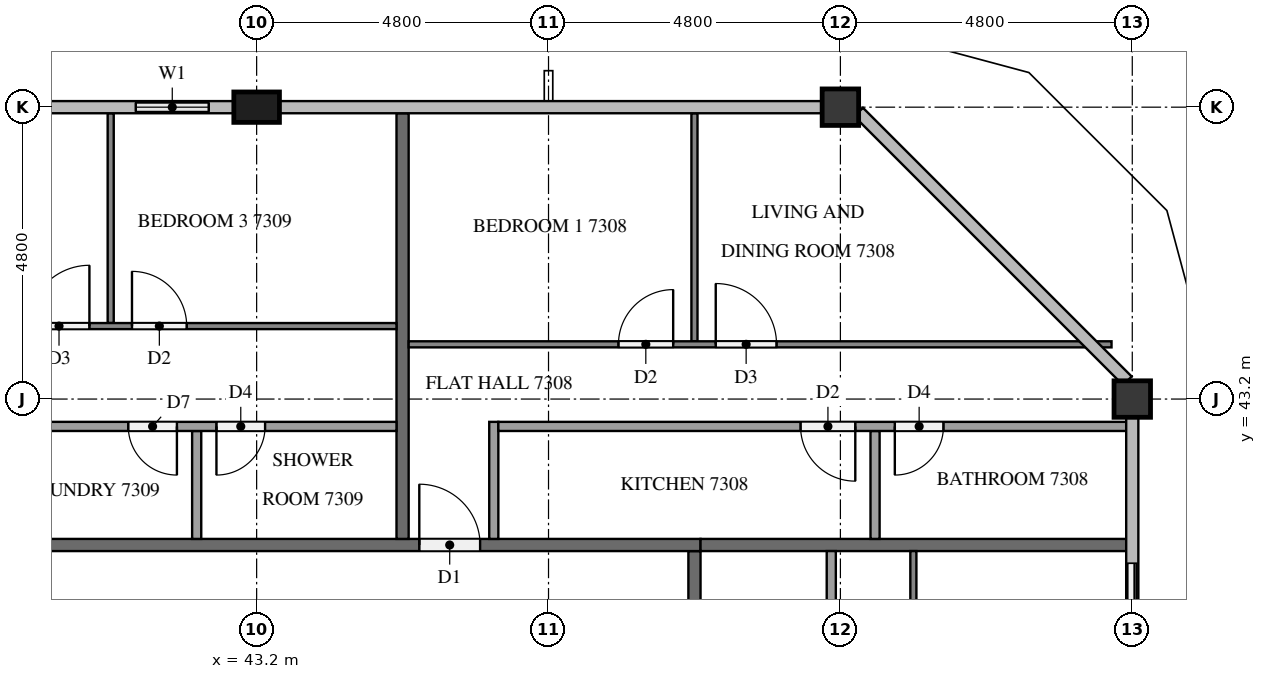
"""IFC4 building model, lengths in metres.
Left out: names, types, materials, properties, quantities, classifications, styles, units other than length and angle.
Written with IfcOpenShell. Run it as: python <this file> out.ifc"""

import sys

from ifc_helpers import new_model, si_unit, direction, frame, frame_2d, origin, origin_2d, place, context, subcontext, project, spatial, rectangle, extrude, element, fill, save


model = new_model("IFC4")
c1 = context("Model", 3, precision=1e-05, world=origin(), true_north=direction((0.0, 1.0)))
c2 = subcontext(c1, "Body", "Model", "MODEL_VIEW")
j1 = project(units=[si_unit("LENGTHUNIT", "METRE"), si_unit("PLANEANGLEUNIT", "RADIAN")], contexts=[c1])
p1 = place(None, origin())
s1 = spatial("IfcSite", under=j1, at=p1, CompositionType="ELEMENT")
p2 = place(p1, origin())
s2 = spatial("IfcBuilding", under=s1, at=p2, CompositionType="ELEMENT")
p3 = place(p2, frame((0.0, 0.0, 279.1)))
s3 = spatial("IfcBuildingStorey", under=s2, at=p3, CompositionType="ELEMENT", Elevation=279.1)
for number, where, z_axis, x_axis in (
    (1, (57.6, 43.2, 0.0), (0.0, 0.0, 1.0), (1.0, 0.0, 0.0)),
    (2, (52.8, 48.0, 0.0), (0.0, 0.0, 1.0), (1.0, 0.0, 0.0)),
):
    element("IfcColumn", number, at=place(p3, frame(where, z_axis=z_axis, x_axis=x_axis)), inside=s3, PredefinedType="COLUMN", context=c2, shape_type="SweptSolid", body=[
        extrude(rectangle(XDim=0.6, YDim=0.6, at=origin_2d()), origin(), (0.0, 0.0, 1.0), 3.2),
    ])
p4 = place(p3, frame((43.2, 48.0, 0.0), z_axis=(0.0, 0.0, 1.0), x_axis=(1.0, 0.0, 0.0)))
e3 = element("IfcColumn", 3, at=p4, inside=s3, PredefinedType="COLUMN", context=c2, shape_type="SweptSolid", body=[
    extrude(rectangle(XDim=0.75, YDim=0.5, at=origin_2d()), origin(), (0.0, 0.0, 1.0), 3.2),
])
p5 = place(p3, frame((57.6, 38.4, 0.0), z_axis=(0.0, 0.0, 1.0), x_axis=(0.0, 1.0, 0.0)))
e4 = element("IfcWall", 4, at=p5, inside=s3, PredefinedType="SOLIDWALL", context=c2, shape_type="SweptSolid", body=[
    extrude(rectangle(XDim=2.4, YDim=0.15, at=frame_2d((1.2, 0.0))), origin(), (0.0, 0.0, 1.0), 3.2),
])
p6 = place(p5, frame((0.3, 0.0, 0.0)))
e5 = element("IfcOpeningElement", 5, at=p6, cuts=e4, PredefinedType="OPENING", context=c2, shape_type="SweptSolid", body=[
    extrude(rectangle(XDim=1.8, YDim=2.4, at=frame_2d((0.9, 1.2))), frame((0.0, 0.085, 0.0), z_axis=(0.0, -1.0, 0.0), x_axis=(1.0, 0.0, 0.0)), (0.0, 0.0, 1.0), 0.17),
])
p7 = place(p3, frame((42.825, 48.0, 0.0), z_axis=(0.0, 0.0, 1.0), x_axis=(-1.0, 0.0, 0.0)))
e6 = element("IfcWall", 6, at=p7, inside=s3, PredefinedType="SOLIDWALL", context=c2, shape_type="SweptSolid", body=[
    extrude(rectangle(XDim=2.025, YDim=0.15, at=frame_2d((1.012, 0.0))), origin(), (0.0, 0.0, 1.0), 3.2),
])
p8 = place(p7, frame((0.413, 0.0, 0.9)))
e7 = element("IfcOpeningElement", 7, at=p8, cuts=e6, PredefinedType="OPENING", context=c2, shape_type="SweptSolid", body=[
    extrude(rectangle(XDim=1.2, YDim=1.4, at=frame_2d((0.6, 0.7))), frame((0.0, 0.085, 0.0), z_axis=(0.0, -1.0, 0.0), x_axis=(1.0, 0.0, 0.0)), (0.0, 0.0, 1.0), 0.17),
])
p9 = place(p3, frame((50.4, 40.7, 0.0), z_axis=(0.0, 0.0, 1.0), x_axis=(0.0, -1.0, 0.0)))
e8 = element("IfcWall", 8, at=p9, inside=s3, PredefinedType="PARTITIONING", context=c2, shape_type="SweptSolid", body=[
    extrude(rectangle(XDim=28.6, YDim=0.2, at=frame_2d((14.3, 0.0))), origin(), (0.0, 0.0, 1.0), 3.2),
])
p10 = place(p9, frame((27.425, 0.0, 0.0)))
e9 = element("IfcOpeningElement", 9, at=p10, cuts=e8, PredefinedType="OPENING", context=c2, shape_type="SweptSolid", body=[
    extrude(rectangle(XDim=1.0, YDim=2.1, at=frame_2d((0.5, 1.05))), frame((0.0, 0.11, 0.0), z_axis=(0.0, -1.0, 0.0), x_axis=(1.0, 0.0, 0.0)), (0.0, 0.0, 1.0), 0.22),
])
p11 = place(p9, frame((13.025, 0.0, 0.0)))
e10 = element("IfcOpeningElement", 10, at=p11, cuts=e8, PredefinedType="OPENING", context=c2, shape_type="SweptSolid", body=[
    extrude(rectangle(XDim=1.0, YDim=2.1, at=frame_2d((0.5, 1.05))), frame((0.0, 0.11, 0.0), z_axis=(0.0, -1.0, 0.0), x_axis=(1.0, 0.0, 0.0)), (0.0, 0.0, 1.0), 0.22),
])
p12 = place(p3, frame((11.9, 40.8, 0.0), z_axis=(0.0, 0.0, 1.0), x_axis=(1.0, 0.0, 0.0)))
e11 = element("IfcWall", 11, at=p12, inside=s3, PredefinedType="PARTITIONING", context=c2, shape_type="SweptSolid", body=[
    extrude(rectangle(XDim=38.6, YDim=0.2, at=frame_2d((19.3, 0.0))), origin(), (0.0, 0.0, 1.0), 3.2),
])
p13 = place(p12, frame((33.975, 0.0, 0.0)))
e12 = element("IfcOpeningElement", 12, at=p13, cuts=e11, PredefinedType="OPENING", context=c2, shape_type="SweptSolid", body=[
    extrude(rectangle(XDim=1.0, YDim=2.1, at=frame_2d((0.5, 1.05))), frame((0.0, 0.11, 0.0), z_axis=(0.0, -1.0, 0.0), x_axis=(1.0, 0.0, 0.0)), (0.0, 0.0, 1.0), 0.22),
])
p14 = place(p12, frame((14.725, 0.0, 0.0)))
e13 = element("IfcOpeningElement", 13, at=p14, cuts=e11, PredefinedType="OPENING", context=c2, shape_type="SweptSolid", body=[
    extrude(rectangle(XDim=1.1, YDim=2.1, at=frame_2d((0.55, 1.05))), frame((0.0, 0.11, 0.0), z_axis=(0.0, -1.0, 0.0), x_axis=(1.0, 0.0, 0.0)), (0.0, 0.0, 1.0), 0.22),
])
p15 = place(p12, frame((13.225, 0.0, 0.0)))
e14 = element("IfcOpeningElement", 14, at=p15, cuts=e11, PredefinedType="OPENING", context=c2, shape_type="SweptSolid", body=[
    extrude(rectangle(XDim=1.0, YDim=2.1, at=frame_2d((0.5, 1.05))), frame((0.0, 0.11, 0.0), z_axis=(0.0, -1.0, 0.0), x_axis=(1.0, 0.0, 0.0)), (0.0, 0.0, 1.0), 0.22),
])
p16 = place(p12, frame((1.225, 0.0, 0.0)))
e15 = element("IfcOpeningElement", 15, at=p16, cuts=e11, PredefinedType="OPENING", context=c2, shape_type="SweptSolid", body=[
    extrude(rectangle(XDim=1.0, YDim=2.1, at=frame_2d((0.5, 1.05))), frame((0.0, 0.11, 0.0), z_axis=(0.0, -1.0, 0.0), x_axis=(1.0, 0.0, 0.0)), (0.0, 0.0, 1.0), 0.22),
])
for number, where, z_axis, x_axis in (
    (16, (50.5, 40.8, 0.0), (0.0, 0.0, 1.0), (1.0, 0.0, 0.0)),
    (17, (45.6, 47.9, 0.0), (0.0, 0.0, 1.0), (0.0, -1.0, 0.0)),
):
    element("IfcWall", number, at=place(p3, frame(where, z_axis=z_axis, x_axis=x_axis)), inside=s3, PredefinedType="PARTITIONING", context=c2, shape_type="SweptSolid", body=[
        extrude(rectangle(XDim=7.0, YDim=0.2, at=frame_2d((3.5, 0.0))), origin(), (0.0, 0.0, 1.0), 3.2),
    ])
p17 = place(p3, frame((54.0, 40.7, 0.0), z_axis=(0.0, 0.0, 1.0), x_axis=(0.0, -1.0, 0.0)))
e18 = element("IfcWall", 18, at=p17, inside=s3, PredefinedType="PARTITIONING", context=c2, shape_type="SweptSolid", body=[
    extrude(rectangle(XDim=14.2, YDim=0.1, at=frame_2d((7.1, 0.0))), origin(), (0.0, 0.0, 1.0), 3.2),
])
p18 = place(p17, frame((13.0, 0.0, 0.0)))
e19 = element("IfcOpeningElement", 19, at=p18, cuts=e18, PredefinedType="OPENING", context=c2, shape_type="SweptSolid", body=[
    extrude(rectangle(XDim=0.9, YDim=2.1, at=frame_2d((0.45, 1.05))), frame((0.0, 0.06, 0.0), z_axis=(0.0, -1.0, 0.0), x_axis=(1.0, 0.0, 0.0)), (0.0, 0.0, 1.0), 0.12),
])
p19 = place(p17, frame((5.05, 0.0, 0.0)))
e20 = element("IfcOpeningElement", 20, at=p19, cuts=e18, PredefinedType="OPENING", context=c2, shape_type="SweptSolid", body=[
    extrude(rectangle(XDim=0.9, YDim=2.1, at=frame_2d((0.45, 1.05))), frame((0.0, 0.06, 0.0), z_axis=(0.0, -1.0, 0.0), x_axis=(1.0, 0.0, 0.0)), (0.0, 0.0, 1.0), 0.12),
])
p20 = place(p17, frame((3.35, 0.0, 0.0)))
e21 = element("IfcOpeningElement", 21, at=p20, cuts=e18, PredefinedType="OPENING", context=c2, shape_type="SweptSolid", body=[
    extrude(rectangle(XDim=1.0, YDim=2.1, at=frame_2d((0.5, 1.05))), frame((0.0, 0.06, 0.0), z_axis=(0.0, -1.0, 0.0), x_axis=(1.0, 0.0, 0.0)), (0.0, 0.0, 1.0), 0.12),
])
p21 = place(p3, frame((52.65, 27.975, 0.0), z_axis=(0.0, 0.0, 1.0), x_axis=(0.0, 1.0, 0.0)))
e22 = element("IfcWall", 22, at=p21, inside=s3, PredefinedType="PARTITIONING", context=c2, shape_type="SweptSolid", body=[
    extrude(rectangle(XDim=12.725, YDim=0.15, at=frame_2d((6.362, 0.0))), origin(), (0.0, 0.0, 1.0), 3.2),
])
p22 = place(p21, frame((0.3, 0.0, 0.0)))
e23 = element("IfcOpeningElement", 23, at=p22, cuts=e22, PredefinedType="OPENING", context=c2, shape_type="SweptSolid", body=[
    extrude(rectangle(XDim=0.8, YDim=2.1, at=frame_2d((0.4, 1.05))), frame((0.0, 0.085, 0.0), z_axis=(0.0, -1.0, 0.0), x_axis=(1.0, 0.0, 0.0)), (0.0, 0.0, 1.0), 0.17),
])
p23 = place(p21, frame((5.627, 0.0, 0.0)))
e24 = element("IfcOpeningElement", 24, at=p23, cuts=e22, PredefinedType="OPENING", context=c2, shape_type="SweptSolid", body=[
    extrude(rectangle(XDim=0.9, YDim=2.1, at=frame_2d((0.45, 1.05))), frame((0.0, 0.085, 0.0), z_axis=(0.0, -1.0, 0.0), x_axis=(1.0, 0.0, 0.0)), (0.0, 0.0, 1.0), 0.17),
])
p24 = place(p21, frame((7.177, 0.0, 0.0)))
e25 = element("IfcOpeningElement", 25, at=p24, cuts=e22, PredefinedType="OPENING", context=c2, shape_type="SweptSolid", body=[
    extrude(rectangle(XDim=0.9, YDim=2.1, at=frame_2d((0.45, 1.05))), frame((0.0, 0.085, 0.0), z_axis=(0.0, -1.0, 0.0), x_axis=(1.0, 0.0, 0.0)), (0.0, 0.0, 1.0), 0.17),
])
p25 = place(p3, frame((50.4, 44.15, 0.0), z_axis=(0.0, 0.0, 1.0), x_axis=(0.0, 1.0, 0.0)))
e26 = element("IfcWall", 26, at=p25, inside=s3, PredefinedType="PARTITIONING", context=c2, shape_type="SweptSolid", body=[
    extrude(rectangle(XDim=3.75, YDim=0.1, at=frame_2d((1.875, 0.0))), origin(), (0.0, 0.0, 1.0), 3.2),
])
p26 = place(p3, frame((45.7, 44.1, 0.0), z_axis=(0.0, 0.0, 1.0), x_axis=(1.0, 0.0, 0.0)))
e27 = element("IfcWall", 27, at=p26, inside=s3, PredefinedType="PARTITIONING", context=c2, shape_type="SweptSolid", body=[
    extrude(rectangle(XDim=11.559, YDim=0.1, at=frame_2d((5.779, 0.0))), origin(), (0.0, 0.0, 1.0), 3.2),
])
p27 = place(p26, frame((3.45, 0.0, 0.0)))
e28 = element("IfcOpeningElement", 28, at=p27, cuts=e27, PredefinedType="OPENING", context=c2, shape_type="SweptSolid", body=[
    extrude(rectangle(XDim=0.9, YDim=2.1, at=frame_2d((0.45, 1.05))), frame((0.0, 0.06, 0.0), z_axis=(0.0, -1.0, 0.0), x_axis=(1.0, 0.0, 0.0)), (0.0, 0.0, 1.0), 0.12),
])
p28 = place(p26, frame((5.05, 0.0, 0.0)))
e29 = element("IfcOpeningElement", 29, at=p28, cuts=e27, PredefinedType="OPENING", context=c2, shape_type="SweptSolid", body=[
    extrude(rectangle(XDim=1.0, YDim=2.1, at=frame_2d((0.5, 1.05))), frame((0.0, 0.06, 0.0), z_axis=(0.0, -1.0, 0.0), x_axis=(1.0, 0.0, 0.0)), (0.0, 0.0, 1.0), 0.12),
])
p29 = place(p3, frame((53.37, 40.9, 0.0), z_axis=(0.0, 0.0, 1.0), x_axis=(0.0, 1.0, 0.0)))
e30 = element("IfcWall", 30, at=p29, inside=s3, PredefinedType="PARTITIONING", context=c2, shape_type="SweptSolid", body=[
    extrude(rectangle(XDim=1.775, YDim=0.15, at=frame_2d((0.888, 0.0))), origin(), (0.0, 0.0, 1.0), 3.2),
])
p30 = place(p3, frame((47.1, 40.9, 0.0), z_axis=(0.0, 0.0, 1.0), x_axis=(0.0, 1.0, 0.0)))
e31 = element("IfcWall", 31, at=p30, inside=s3, PredefinedType="PARTITIONING", context=c2, shape_type="SweptSolid", body=[
    extrude(rectangle(XDim=1.925, YDim=0.15, at=frame_2d((0.962, 0.0))), origin(), (0.0, 0.0, 1.0), 3.2),
])
p31 = place(p3, frame((57.5, 42.75, 0.0), z_axis=(0.0, 0.0, 1.0), x_axis=(-1.0, 0.0, 0.0)))
e32 = element("IfcWall", 32, at=p31, inside=s3, PredefinedType="PARTITIONING", context=c2, shape_type="SweptSolid", body=[
    extrude(rectangle(XDim=10.325, YDim=0.15, at=frame_2d((5.163, 0.0))), origin(), (0.0, 0.0, 1.0), 3.2),
])
p32 = place(p31, frame((4.455, 0.0, 0.0)))
e33 = element("IfcOpeningElement", 33, at=p32, cuts=e32, PredefinedType="OPENING", context=c2, shape_type="SweptSolid", body=[
    extrude(rectangle(XDim=0.9, YDim=2.1, at=frame_2d((0.45, 1.05))), frame((0.0, 0.085, 0.0), z_axis=(0.0, -1.0, 0.0), x_axis=(1.0, 0.0, 0.0)), (0.0, 0.0, 1.0), 0.17),
])
p33 = place(p31, frame((3.005, 0.0, 0.0)))
e34 = element("IfcOpeningElement", 34, at=p33, cuts=e32, PredefinedType="OPENING", context=c2, shape_type="SweptSolid", body=[
    extrude(rectangle(XDim=0.8, YDim=2.1, at=frame_2d((0.4, 1.05))), frame((0.0, 0.085, 0.0), z_axis=(0.0, -1.0, 0.0), x_axis=(1.0, 0.0, 0.0)), (0.0, 0.0, 1.0), 0.17),
])
p34 = place(p3, frame((40.8, 44.45, 0.0), z_axis=(0.0, 0.0, 1.0), x_axis=(0.0, 1.0, 0.0)))
e35 = element("IfcWall", 35, at=p34, inside=s3, PredefinedType="PARTITIONING", context=c2, shape_type="SweptSolid", body=[
    extrude(rectangle(XDim=3.45, YDim=0.1, at=frame_2d((1.725, 0.0))), origin(), (0.0, 0.0, 1.0), 3.2),
])
p35 = place(p3, frame((26.5, 44.4, 0.0), z_axis=(0.0, 0.0, 1.0), x_axis=(1.0, 0.0, 0.0)))
e36 = element("IfcWall", 36, at=p35, inside=s3, PredefinedType="PARTITIONING", context=c2, shape_type="SweptSolid", body=[
    extrude(rectangle(XDim=19.0, YDim=0.1, at=frame_2d((9.5, 0.0))), origin(), (0.0, 0.0, 1.0), 3.2),
])
p36 = place(p35, frame((3.45, 0.0, 0.0)))
e37 = element("IfcOpeningElement", 37, at=p36, cuts=e36, PredefinedType="OPENING", context=c2, shape_type="SweptSolid", body=[
    extrude(rectangle(XDim=0.9, YDim=2.1, at=frame_2d((0.45, 1.05))), frame((0.0, 0.06, 0.0), z_axis=(0.0, -1.0, 0.0), x_axis=(1.0, 0.0, 0.0)), (0.0, 0.0, 1.0), 0.12),
])
p37 = place(p35, frame((5.05, 0.0, 0.0)))
e38 = element("IfcOpeningElement", 38, at=p37, cuts=e36, PredefinedType="OPENING", context=c2, shape_type="SweptSolid", body=[
    extrude(rectangle(XDim=0.9, YDim=2.1, at=frame_2d((0.45, 1.05))), frame((0.0, 0.06, 0.0), z_axis=(0.0, -1.0, 0.0), x_axis=(1.0, 0.0, 0.0)), (0.0, 0.0, 1.0), 0.12),
])
p38 = place(p35, frame((12.95, 0.0, 0.0)))
e39 = element("IfcOpeningElement", 39, at=p38, cuts=e36, PredefinedType="OPENING", context=c2, shape_type="SweptSolid", body=[
    extrude(rectangle(XDim=1.0, YDim=2.1, at=frame_2d((0.5, 1.05))), frame((0.0, 0.06, 0.0), z_axis=(0.0, -1.0, 0.0), x_axis=(1.0, 0.0, 0.0)), (0.0, 0.0, 1.0), 0.12),
])
p39 = place(p35, frame((14.65, 0.0, 0.0)))
e40 = element("IfcOpeningElement", 40, at=p39, cuts=e36, PredefinedType="OPENING", context=c2, shape_type="SweptSolid", body=[
    extrude(rectangle(XDim=0.9, YDim=2.1, at=frame_2d((0.45, 1.05))), frame((0.0, 0.06, 0.0), z_axis=(0.0, -1.0, 0.0), x_axis=(1.0, 0.0, 0.0)), (0.0, 0.0, 1.0), 0.12),
])
p40 = place(p3, frame((42.214, 40.9, 0.0), z_axis=(0.0, 0.0, 1.0), x_axis=(0.0, 1.0, 0.0)))
e41 = element("IfcWall", 41, at=p40, inside=s3, PredefinedType="PARTITIONING", context=c2, shape_type="SweptSolid", body=[
    extrude(rectangle(XDim=1.775, YDim=0.15, at=frame_2d((0.888, 0.0))), origin(), (0.0, 0.0, 1.0), 3.2),
])
p41 = place(p3, frame((45.5, 42.75, 0.0), z_axis=(0.0, 0.0, 1.0), x_axis=(-1.0, 0.0, 0.0)))
e42 = element("IfcWall", 42, at=p41, inside=s3, PredefinedType="PARTITIONING", context=c2, shape_type="SweptSolid", body=[
    extrude(rectangle(XDim=17.525, YDim=0.15, at=frame_2d((8.762, 0.0))), origin(), (0.0, 0.0, 1.0), 3.2),
])
p42 = place(p41, frame((13.469, 0.0, 0.0)))
e43 = element("IfcOpeningElement", 43, at=p42, cuts=e42, PredefinedType="OPENING", context=c2, shape_type="SweptSolid", body=[
    extrude(rectangle(XDim=0.9, YDim=2.1, at=frame_2d((0.45, 1.05))), frame((0.0, 0.085, 0.0), z_axis=(0.0, -1.0, 0.0), x_axis=(1.0, 0.0, 0.0)), (0.0, 0.0, 1.0), 0.17),
])
p43 = place(p41, frame((11.919, 0.0, 0.0)))
e44 = element("IfcOpeningElement", 44, at=p43, cuts=e42, PredefinedType="OPENING", context=c2, shape_type="SweptSolid", body=[
    extrude(rectangle(XDim=0.9, YDim=2.1, at=frame_2d((0.45, 1.05))), frame((0.0, 0.085, 0.0), z_axis=(0.0, -1.0, 0.0), x_axis=(1.0, 0.0, 0.0)), (0.0, 0.0, 1.0), 0.17),
])
p44 = place(p41, frame((3.611, 0.0, 0.0)))
e45 = element("IfcOpeningElement", 45, at=p44, cuts=e42, PredefinedType="OPENING", context=c2, shape_type="SweptSolid", body=[
    extrude(rectangle(XDim=0.8, YDim=2.1, at=frame_2d((0.4, 1.05))), frame((0.0, 0.085, 0.0), z_axis=(0.0, -1.0, 0.0), x_axis=(1.0, 0.0, 0.0)), (0.0, 0.0, 1.0), 0.17),
])
p45 = place(p41, frame((2.161, 0.0, 0.0)))
e46 = element("IfcOpeningElement", 46, at=p45, cuts=e42, PredefinedType="OPENING", context=c2, shape_type="SweptSolid", body=[
    extrude(rectangle(XDim=0.8, YDim=2.1, at=frame_2d((0.4, 1.05))), frame((0.0, 0.085, 0.0), z_axis=(0.0, -1.0, 0.0), x_axis=(1.0, 0.0, 0.0)), (0.0, 0.0, 1.0), 0.17),
])
p46 = place(p6, origin())
e47 = element("IfcDoor", 47, at=p46, inside=s3, OperationType="SLIDING_TO_RIGHT", PredefinedType="DOOR", context=c2, shape_type="SweptSolid", body=[
    extrude(rectangle(XDim=1.8, YDim=2.4, at=frame_2d((0.9, 1.2))), frame((0.0, 0.025, 0.0), z_axis=(0.0, -1.0, 0.0), x_axis=(1.0, 0.0, 0.0)), (0.0, 0.0, 1.0), 0.05),
])
fill(e5, e47)
p47 = place(p8, origin())
e48 = element("IfcWindow", 48, at=p47, inside=s3, PartitioningType="SINGLE_PANEL", PredefinedType="WINDOW", context=c2, shape_type="SweptSolid", body=[
    extrude(rectangle(XDim=1.2, YDim=1.4, at=frame_2d((0.6, 0.7))), frame((0.0, 0.03, 0.0), z_axis=(0.0, -1.0, 0.0), x_axis=(1.0, 0.0, 0.0)), (0.0, 0.0, 1.0), 0.06),
])
fill(e7, e48)
p48 = place(p13, origin())
e49 = element("IfcDoor", 49, at=p48, inside=s3, OperationType="SINGLE_SWING_LEFT", PredefinedType="DOOR", context=c2, shape_type="SweptSolid", body=[
    extrude(rectangle(XDim=1.0, YDim=2.1, at=frame_2d((0.5, 1.05))), frame((0.0, 0.025, 0.0), z_axis=(0.0, -1.0, 0.0), x_axis=(1.0, 0.0, 0.0)), (0.0, 0.0, 1.0), 0.05),
])
fill(e12, e49)
p49 = place(p27, origin())
e50 = element("IfcDoor", 50, at=p49, inside=s3, OperationType="SINGLE_SWING_RIGHT", PredefinedType="DOOR", context=c2, shape_type="SweptSolid", body=[
    extrude(rectangle(XDim=0.9, YDim=2.1, at=frame_2d((0.45, 1.05))), frame((0.0, 0.025, 0.0), z_axis=(0.0, -1.0, 0.0), x_axis=(1.0, 0.0, 0.0)), (0.0, 0.0, 1.0), 0.05),
])
fill(e28, e50)
p50 = place(p28, origin())
e51 = element("IfcDoor", 51, at=p50, inside=s3, OperationType="SINGLE_SWING_LEFT", PredefinedType="DOOR", context=c2, shape_type="SweptSolid", body=[
    extrude(rectangle(XDim=1.0, YDim=2.1, at=frame_2d((0.5, 1.05))), frame((0.0, 0.025, 0.0), z_axis=(0.0, -1.0, 0.0), x_axis=(1.0, 0.0, 0.0)), (0.0, 0.0, 1.0), 0.05),
])
fill(e29, e51)
p51 = place(p32, origin())
e52 = element("IfcDoor", 52, at=p51, inside=s3, OperationType="SINGLE_SWING_LEFT", PredefinedType="DOOR", context=c2, shape_type="SweptSolid", body=[
    extrude(rectangle(XDim=0.9, YDim=2.1, at=frame_2d((0.45, 1.05))), frame((0.0, 0.025, 0.0), z_axis=(0.0, -1.0, 0.0), x_axis=(1.0, 0.0, 0.0)), (0.0, 0.0, 1.0), 0.05),
])
fill(e33, e52)
p52 = place(p33, origin())
e53 = element("IfcDoor", 53, at=p52, inside=s3, OperationType="SINGLE_SWING_RIGHT", PredefinedType="DOOR", context=c2, shape_type="SweptSolid", body=[
    extrude(rectangle(XDim=0.8, YDim=2.1, at=frame_2d((0.4, 1.05))), frame((0.0, 0.025, 0.0), z_axis=(0.0, -1.0, 0.0), x_axis=(1.0, 0.0, 0.0)), (0.0, 0.0, 1.0), 0.05),
])
fill(e34, e53)
p53 = place(p38, origin())
e54 = element("IfcDoor", 54, at=p53, inside=s3, OperationType="SINGLE_SWING_RIGHT", PredefinedType="DOOR", context=c2, shape_type="SweptSolid", body=[
    extrude(rectangle(XDim=1.0, YDim=2.1, at=frame_2d((0.5, 1.05))), frame((0.0, 0.025, 0.0), z_axis=(0.0, -1.0, 0.0), x_axis=(1.0, 0.0, 0.0)), (0.0, 0.0, 1.0), 0.05),
])
fill(e39, e54)
p54 = place(p39, origin())
e55 = element("IfcDoor", 55, at=p54, inside=s3, OperationType="SINGLE_SWING_LEFT", PredefinedType="DOOR", context=c2, shape_type="SweptSolid", body=[
    extrude(rectangle(XDim=0.9, YDim=2.1, at=frame_2d((0.45, 1.05))), frame((0.0, 0.025, 0.0), z_axis=(0.0, -1.0, 0.0), x_axis=(1.0, 0.0, 0.0)), (0.0, 0.0, 1.0), 0.05),
])
fill(e40, e55)
p55 = place(p44, origin())
e56 = element("IfcDoor", 56, at=p55, inside=s3, OperationType="SINGLE_SWING_LEFT", PredefinedType="DOOR", context=c2, shape_type="SweptSolid", body=[
    extrude(rectangle(XDim=0.8, YDim=2.1, at=frame_2d((0.4, 1.05))), frame((0.0, 0.025, 0.0), z_axis=(0.0, -1.0, 0.0), x_axis=(1.0, 0.0, 0.0)), (0.0, 0.0, 1.0), 0.05),
])
fill(e45, e56)
p56 = place(p45, origin())
e57 = element("IfcDoor", 57, at=p56, inside=s3, OperationType="SINGLE_SWING_RIGHT", PredefinedType="DOOR", context=c2, shape_type="SweptSolid", body=[
    extrude(rectangle(XDim=0.8, YDim=2.1, at=frame_2d((0.4, 1.05))), frame((0.0, 0.025, 0.0), z_axis=(0.0, -1.0, 0.0), x_axis=(1.0, 0.0, 0.0)), (0.0, 0.0, 1.0), 0.05),
])
fill(e46, e57)
save(model, sys.argv[1])
